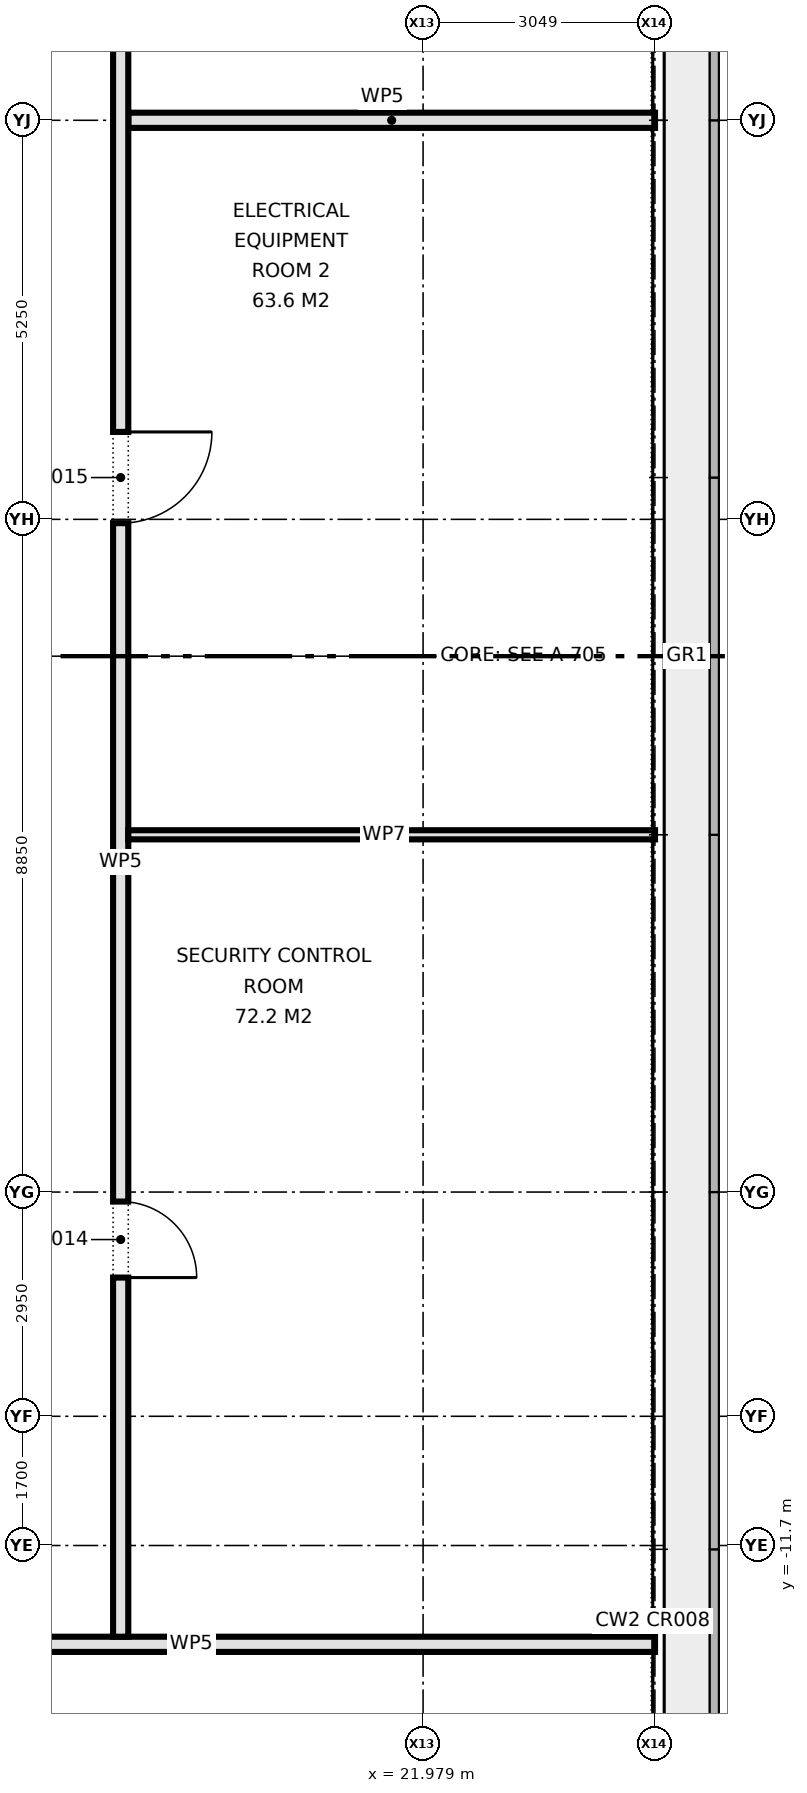
"""IFC4 building model, lengths in metres.
Left out: names, types, materials, properties, quantities, classifications, styles, units other than length and angle.
Written with IfcOpenShell. Run it as: python <this file> out.ifc"""

import sys

from ifc_helpers import new_model, si_unit, direction, frame, frame_2d, origin, place, context, subcontext, project, spatial, rectangle, extrude, element, fill, save


model = new_model("IFC4")
c1 = context("Model", 3, precision=1e-05, world=origin(), true_north=direction((0.0, 1.0)))
c2 = subcontext(c1, "Body", "Model", "MODEL_VIEW")
j1 = project(units=[si_unit("LENGTHUNIT", "METRE"), si_unit("PLANEANGLEUNIT", "RADIAN")], contexts=[c1])
p1 = place(None, origin())
s1 = spatial("IfcSite", under=j1, at=p1, CompositionType="ELEMENT")
p2 = place(p1, origin())
s2 = spatial("IfcBuilding", under=s1, at=p2, CompositionType="ELEMENT")
p3 = place(p2, frame((0.0, 0.0, 20.9)))
s3 = spatial("IfcBuildingStorey", under=s2, at=p3, CompositionType="ELEMENT", Elevation=20.9)
p4 = place(p3, frame((-25.03, -13.0, 0.0), z_axis=(0.0, 0.0, 1.0), x_axis=(1.0, 0.0, 0.0)))
e1 = element("IfcWall", 1, at=p4, inside=s3, PredefinedType="PARTITIONING", context=c2, shape_type="SweptSolid", body=[
    extrude(rectangle(XDim=50.06, YDim=0.2, at=frame_2d((25.03, 0.0))), origin(), (0.0, 0.0, 1.0), 4.575),
])
p5 = place(p4, frame((9.25, 0.0, 0.0)))
e2 = element("IfcOpeningElement", 2, at=p5, cuts=e1, PredefinedType="OPENING", context=c2, shape_type="SweptSolid", body=[
    extrude(rectangle(XDim=1.8, YDim=2.1, at=frame_2d((0.9, 1.05))), frame((0.0, 0.11, 0.0), z_axis=(0.0, -1.0, 0.0), x_axis=(1.0, 0.0, 0.0)), (0.0, 0.0, 1.0), 0.22),
])
p6 = place(p4, frame((17.08, 0.0, 0.0)))
e3 = element("IfcOpeningElement", 3, at=p6, cuts=e1, PredefinedType="OPENING", context=c2, shape_type="SweptSolid", body=[
    extrude(rectangle(XDim=1.8, YDim=2.1, at=frame_2d((0.9, 1.05))), frame((0.0, 0.11, 0.0), z_axis=(0.0, -1.0, 0.0), x_axis=(1.0, 0.0, 0.0)), (0.0, 0.0, 1.0), 0.22),
])
p7 = place(p4, frame((36.06, 0.0, 0.0)))
e4 = element("IfcOpeningElement", 4, at=p7, cuts=e1, PredefinedType="OPENING", context=c2, shape_type="SweptSolid", body=[
    extrude(rectangle(XDim=1.8, YDim=2.1, at=frame_2d((0.9, 1.05))), frame((0.0, 0.11, 0.0), z_axis=(0.0, -1.0, 0.0), x_axis=(1.0, 0.0, 0.0)), (0.0, 0.0, 1.0), 0.22),
])
p8 = place(p4, frame((23.68, 0.0, 0.0)))
e5 = element("IfcOpeningElement", 5, at=p8, cuts=e1, PredefinedType="OPENING", context=c2, shape_type="SweptSolid", body=[
    extrude(rectangle(XDim=1.0, YDim=2.1, at=frame_2d((0.5, 1.05))), frame((0.0, 0.11, 0.0), z_axis=(0.0, -1.0, 0.0), x_axis=(1.0, 0.0, 0.0)), (0.0, 0.0, 1.0), 0.22),
])
p9 = place(p4, frame((26.68, 0.0, 0.0)))
e6 = element("IfcOpeningElement", 6, at=p9, cuts=e1, PredefinedType="OPENING", context=c2, shape_type="SweptSolid", body=[
    extrude(rectangle(XDim=1.0, YDim=2.1, at=frame_2d((0.5, 1.05))), frame((0.0, 0.11, 0.0), z_axis=(0.0, -1.0, 0.0), x_axis=(1.0, 0.0, 0.0)), (0.0, 0.0, 1.0), 0.22),
])
p10 = place(p4, frame((29.28, 0.0, 0.0)))
e7 = element("IfcOpeningElement", 7, at=p10, cuts=e1, PredefinedType="OPENING", context=c2, shape_type="SweptSolid", body=[
    extrude(rectangle(XDim=1.0, YDim=2.1, at=frame_2d((0.5, 1.05))), frame((0.0, 0.11, 0.0), z_axis=(0.0, -1.0, 0.0), x_axis=(1.0, 0.0, 0.0)), (0.0, 0.0, 1.0), 0.22),
])
p11 = place(p3, frame((18.1, 7.05, 0.0), z_axis=(0.0, 0.0, 1.0), x_axis=(1.0, 0.0, 0.0)))
e8 = element("IfcWall", 8, at=p11, inside=s3, PredefinedType="PARTITIONING", context=c2, shape_type="SweptSolid", body=[
    extrude(rectangle(XDim=6.93, YDim=0.2, at=frame_2d((3.465, 0.0))), origin(), (0.0, 0.0, 1.0), 4.575),
])
p12 = place(p3, frame((18.0, -12.9, 0.0), z_axis=(0.0, 0.0, 1.0), x_axis=(0.0, 1.0, 0.0)))
e9 = element("IfcWall", 9, at=p12, inside=s3, PredefinedType="PARTITIONING", context=c2, shape_type="SweptSolid", body=[
    extrude(rectangle(XDim=25.8, YDim=0.2, at=frame_2d((12.9, 0.0))), origin(), (0.0, 0.0, 1.0), 4.575),
])
p13 = place(p12, frame((4.725, 0.0, 0.0)))
e10 = element("IfcOpeningElement", 10, at=p13, cuts=e9, PredefinedType="OPENING", context=c2, shape_type="SweptSolid", body=[
    extrude(rectangle(XDim=1.0, YDim=2.1, at=frame_2d((0.5, 1.05))), frame((0.0, 0.11, 0.0), z_axis=(0.0, -1.0, 0.0), x_axis=(1.0, 0.0, 0.0)), (0.0, 0.0, 1.0), 0.22),
])
p14 = place(p12, frame((14.65, 0.0, 0.0)))
e11 = element("IfcOpeningElement", 11, at=p14, cuts=e9, PredefinedType="OPENING", context=c2, shape_type="SweptSolid", body=[
    extrude(rectangle(XDim=1.2, YDim=2.1, at=frame_2d((0.6, 1.05))), frame((0.0, 0.11, 0.0), z_axis=(0.0, -1.0, 0.0), x_axis=(1.0, 0.0, 0.0)), (0.0, 0.0, 1.0), 0.22),
])
p15 = place(p12, frame((22.025, 0.0, 0.0)))
e12 = element("IfcOpeningElement", 12, at=p15, cuts=e9, PredefinedType="OPENING", context=c2, shape_type="SweptSolid", body=[
    extrude(rectangle(XDim=1.8, YDim=2.1, at=frame_2d((0.9, 1.05))), frame((0.0, 0.11, 0.0), z_axis=(0.0, -1.0, 0.0), x_axis=(1.0, 0.0, 0.0)), (0.0, 0.0, 1.0), 0.22),
])
p16 = place(p3, frame((18.1, -2.35, 0.0), z_axis=(0.0, 0.0, 1.0), x_axis=(1.0, 0.0, 0.0)))
e13 = element("IfcWall", 13, at=p16, inside=s3, PredefinedType="PARTITIONING", context=c2, shape_type="SweptSolid", body=[
    extrude(rectangle(XDim=6.93, YDim=0.12, at=frame_2d((3.465, 0.0))), origin(), (0.0, 0.0, 1.0), 4.575),
])
p17 = place(p13, frame((1.0, 0.0, 0.0), z_axis=(0.0, 0.0, 1.0), x_axis=(-1.0, 0.0, 0.0)))
e14 = element("IfcDoor", 14, at=p17, inside=s3, OperationType="SINGLE_SWING_RIGHT", PredefinedType="DOOR", context=c2, shape_type="SweptSolid", body=[
    extrude(rectangle(XDim=1.0, YDim=2.1, at=frame_2d((0.5, 1.05))), frame((0.0, 0.025, 0.0), z_axis=(0.0, -1.0, 0.0), x_axis=(1.0, 0.0, 0.0)), (0.0, 0.0, 1.0), 0.05),
])
fill(e10, e14)
p18 = place(p14, frame((1.2, 0.0, 0.0), z_axis=(0.0, 0.0, 1.0), x_axis=(-1.0, 0.0, 0.0)))
e15 = element("IfcDoor", 15, at=p18, inside=s3, OperationType="SINGLE_SWING_LEFT", PredefinedType="DOOR", context=c2, shape_type="SweptSolid", body=[
    extrude(rectangle(XDim=1.2, YDim=2.1, at=frame_2d((0.6, 1.05))), frame((0.0, 0.025, 0.0), z_axis=(0.0, -1.0, 0.0), x_axis=(1.0, 0.0, 0.0)), (0.0, 0.0, 1.0), 0.05),
])
fill(e11, e15)
save(model, sys.argv[1])
